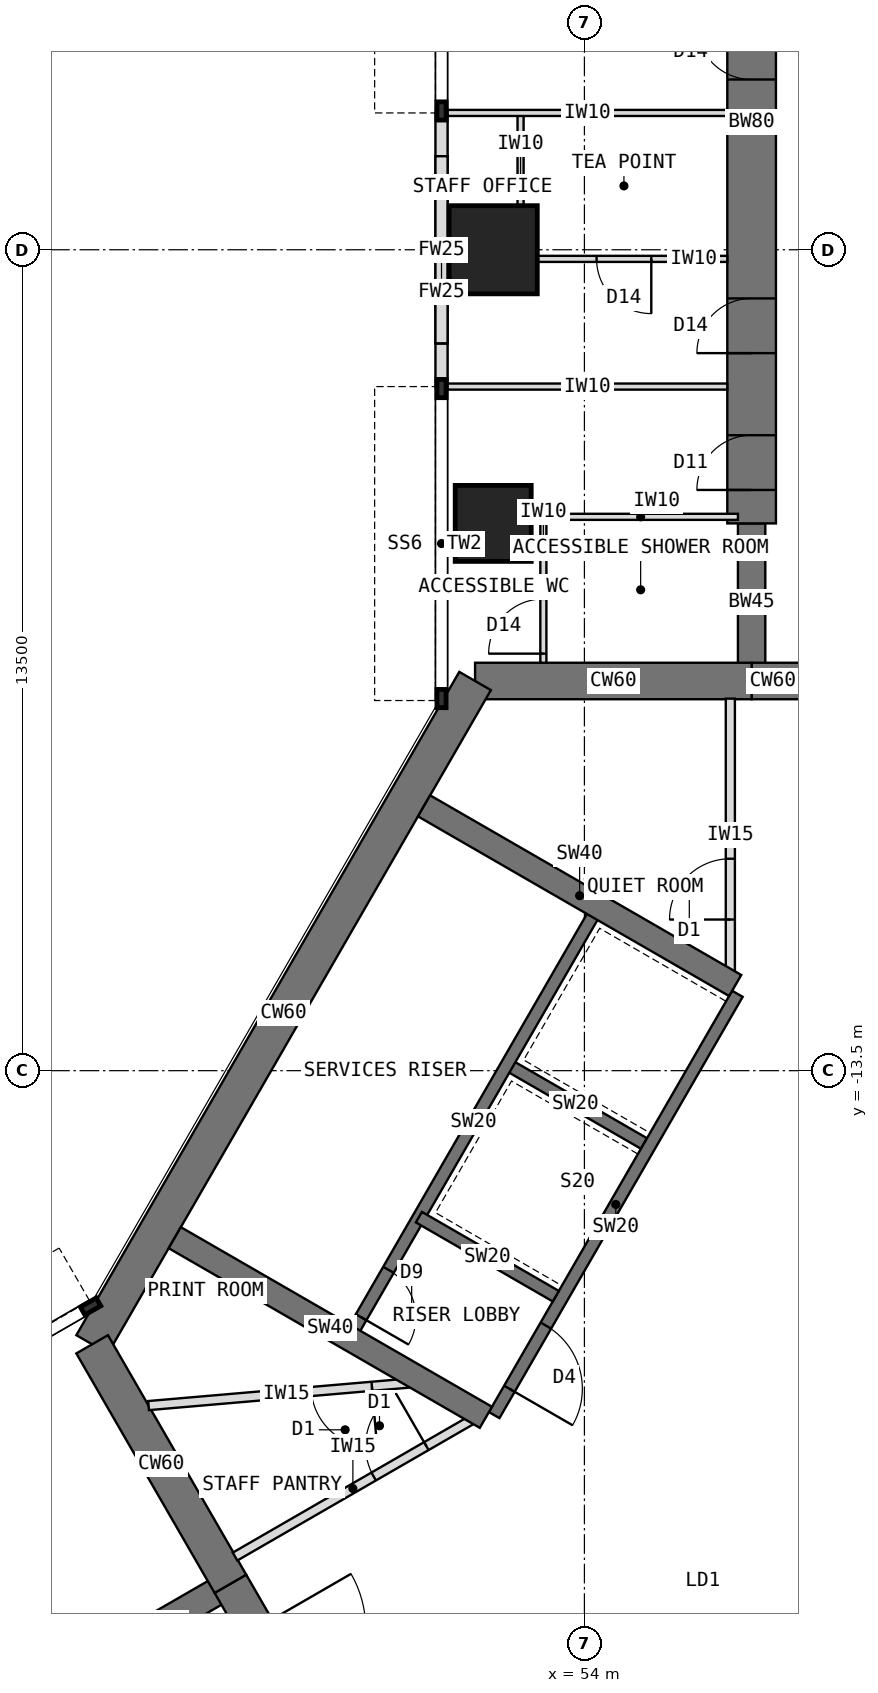
"""IFC4 building model, lengths in metres.
Left out: names, types, materials, properties, quantities, classifications, styles, units other than length and angle.
Written with IfcOpenShell. Run it as: python <this file> out.ifc"""

import sys

from ifc_helpers import new_model, si_unit, direction, frame, frame_2d, origin, origin_2d, place, context, subcontext, project, spatial, rectangle, extrude, element, fill, save


model = new_model("IFC4")
c1 = context("Model", 3, precision=1e-05, world=origin(), true_north=direction((0.0, 1.0)))
c2 = subcontext(c1, "Body", "Model", "MODEL_VIEW")
j1 = project(units=[si_unit("LENGTHUNIT", "METRE"), si_unit("PLANEANGLEUNIT", "RADIAN")], contexts=[c1])
p1 = place(None, origin())
s1 = spatial("IfcSite", under=j1, at=p1, CompositionType="ELEMENT")
p2 = place(p1, origin())
s2 = spatial("IfcBuilding", under=s1, at=p2, CompositionType="ELEMENT")
p3 = place(p2, frame((0.0, 0.0, 161.5)))
s3 = spatial("IfcBuildingStorey", under=s2, at=p3, CompositionType="ELEMENT", Elevation=161.5)
p4 = place(p3, frame((60.25, -7.092, 0.0), z_axis=(0.0, 0.0, 1.0), x_axis=(-1.0, 0.0, 0.0)))
e1 = element("IfcWall", 1, at=p4, inside=s3, PredefinedType="SHEAR", context=c2, shape_type="SweptSolid", body=[
    extrude(rectangle(XDim=3.5, YDim=0.6, at=frame_2d((1.75, 0.0))), origin(), (0.0, 0.0, 1.0), 4.0),
])
p5 = place(p4, frame((0.85, 0.0, 0.0)))
e2 = element("IfcOpeningElement", 2, at=p5, cuts=e1, PredefinedType="OPENING", context=c2, shape_type="SweptSolid", body=[
    extrude(rectangle(XDim=1.8, YDim=2.1, at=frame_2d((0.9, 1.05))), frame((0.0, 0.31, 0.0), z_axis=(0.0, -1.0, 0.0), x_axis=(1.0, 0.0, 0.0)), (0.0, 0.0, 1.0), 0.62),
])
p6 = place(p3, frame((56.75, -7.092, 0.0), z_axis=(0.0, 0.0, 1.0), x_axis=(-1.0, 0.0, 0.0)))
e3 = element("IfcWall", 3, at=p6, inside=s3, PredefinedType="SHEAR", context=c2, shape_type="SweptSolid", body=[
    extrude(rectangle(XDim=4.548, YDim=0.6, at=frame_2d((2.274, 0.0))), origin(), (0.0, 0.0, 1.0), 4.0),
])
p7 = place(p3, frame((52.202, -7.092, 0.0), z_axis=(0.0, 0.0, 1.0), x_axis=(-0.500005998175, -0.866021940709, 0.0)))
e4 = element("IfcWall", 4, at=p7, inside=s3, PredefinedType="SHEAR", context=c2, shape_type="SweptSolid", body=[
    extrude(rectangle(XDim=12.596, YDim=0.6, at=frame_2d((6.298, 0.0))), origin(), (0.0, 0.0, 1.0), 4.0),
])
p8 = place(p3, frame((45.904, -18.0, 0.0), z_axis=(0.0, 0.0, 1.0), x_axis=(0.500024481964, -0.866011268655, 0.0)))
e5 = element("IfcWall", 5, at=p8, inside=s3, PredefinedType="SHEAR", context=c2, shape_type="SweptSolid", body=[
    extrude(rectangle(XDim=4.548, YDim=0.6, at=frame_2d((2.274, 0.0))), origin(), (0.0, 0.0, 1.0), 4.0),
])
p9 = place(p3, frame((48.178, -21.939, 0.0), z_axis=(0.0, 0.0, 1.0), x_axis=(0.500010275428, -0.866019471182, 0.0)))
e6 = element("IfcWall", 6, at=p9, inside=s3, PredefinedType="SHEAR", context=c2, shape_type="SweptSolid", body=[
    extrude(rectangle(XDim=3.5, YDim=0.6, at=frame_2d((1.75, 0.0))), origin(), (0.0, 0.0, 1.0), 4.0),
])
p10 = place(p9, frame((0.85, 0.0, 0.0)))
e7 = element("IfcOpeningElement", 7, at=p10, cuts=e6, PredefinedType="OPENING", context=c2, shape_type="SweptSolid", body=[
    extrude(rectangle(XDim=1.8, YDim=2.1, at=frame_2d((0.9, 1.05))), frame((0.0, 0.31, 0.0), z_axis=(0.0, -1.0, 0.0), x_axis=(1.0, 0.0, 0.0)), (0.0, 0.0, 1.0), 0.62),
])
p11 = place(p3, frame((56.75, -7.092, 0.0), z_axis=(0.0, 0.0, 1.0), x_axis=(0.0, 1.0, 0.0)))
e8 = element("IfcWall", 8, at=p11, inside=s3, PredefinedType="SHEAR", context=c2, shape_type="SweptSolid", body=[
    extrude(rectangle(XDim=2.592, YDim=0.45, at=frame_2d((1.296, 0.0))), origin(), (0.0, 0.0, 1.0), 4.0),
])
p12 = place(p3, frame((56.75, -4.5, 0.0), z_axis=(0.0, 0.0, 1.0), x_axis=(0.0, 1.0, 0.0)))
e9 = element("IfcWall", 9, at=p12, inside=s3, PredefinedType="SHEAR", context=c2, shape_type="SweptSolid", body=[
    extrude(rectangle(XDim=13.2, YDim=0.8, at=frame_2d((6.6, 0.0))), origin(), (0.0, 0.0, 1.0), 4.0),
])
p13 = place(p12, frame((0.55, 0.0, 0.0)))
e10 = element("IfcOpeningElement", 10, at=p13, cuts=e9, PredefinedType="OPENING", context=c2, shape_type="SweptSolid", body=[
    extrude(rectangle(XDim=0.9, YDim=2.1, at=frame_2d((0.45, 1.05))), frame((0.0, 0.41, 0.0), z_axis=(0.0, -1.0, 0.0), x_axis=(1.0, 0.0, 0.0)), (0.0, 0.0, 1.0), 0.82),
])
p14 = place(p12, frame((2.8, 0.0, 0.0)))
e11 = element("IfcOpeningElement", 11, at=p14, cuts=e9, PredefinedType="OPENING", context=c2, shape_type="SweptSolid", body=[
    extrude(rectangle(XDim=0.9, YDim=2.1, at=frame_2d((0.45, 1.05))), frame((0.0, 0.41, 0.0), z_axis=(0.0, -1.0, 0.0), x_axis=(1.0, 0.0, 0.0)), (0.0, 0.0, 1.0), 0.82),
])
p15 = place(p12, frame((7.3, 0.0, 0.0)))
e12 = element("IfcOpeningElement", 12, at=p15, cuts=e9, PredefinedType="OPENING", context=c2, shape_type="SweptSolid", body=[
    extrude(rectangle(XDim=0.9, YDim=2.1, at=frame_2d((0.45, 1.05))), frame((0.0, 0.41, 0.0), z_axis=(0.0, -1.0, 0.0), x_axis=(1.0, 0.0, 0.0)), (0.0, 0.0, 1.0), 0.82),
])
p16 = place(p3, frame((48.178, -21.939, 0.0), z_axis=(0.0, 0.0, 1.0), x_axis=(-0.866072649678, -0.499918158782, 0.0)))
e13 = element("IfcWall", 13, at=p16, inside=s3, PredefinedType="SHEAR", context=c2, shape_type="SweptSolid", body=[
    extrude(rectangle(XDim=2.592, YDim=0.45, at=frame_2d((1.296, 0.0))), origin(), (0.0, 0.0, 1.0), 4.0),
])
p17 = place(p3, frame((52.5, -4.5, 0.0), z_axis=(0.0, 0.0, 1.0), x_axis=(1.0, 0.0, 0.0)))
e14 = element("IfcColumn", 14, at=p17, inside=s3, PredefinedType="COLUMN", context=c2, shape_type="SweptSolid", body=[
    extrude(rectangle(XDim=1.25, YDim=1.25, at=origin_2d()), origin(), (0.0, 0.0, 1.0), 4.0),
])
p18 = place(p3, frame((52.5, 0.0, 0.0), z_axis=(0.0, 0.0, 1.0), x_axis=(1.0, 0.0, 0.0)))
e15 = element("IfcColumn", 15, at=p18, inside=s3, PredefinedType="COLUMN", context=c2, shape_type="SweptSolid", body=[
    extrude(rectangle(XDim=1.45, YDim=1.45, at=origin_2d()), origin(), (0.0, 0.0, 1.0), 4.0),
])
for number, where, z_axis, x_axis in (
    (16, (51.65, -2.25, 0.0), (0.0, 0.0, 1.0), (0.0, 1.0, 0.0)),
    (17, (51.65, 1.539, 0.0), (0.0, 0.0, 1.0), (0.0, 1.0, 0.0)),
):
    element("IfcWall", number, at=place(p3, frame(where, z_axis=z_axis, x_axis=x_axis)), inside=s3, PredefinedType="STANDARD", context=c2, shape_type="SweptSolid", body=[
        extrude(rectangle(XDim=0.711, YDim=0.2, at=frame_2d((0.356, 0.0))), origin(), (0.0, 0.0, 1.0), 4.0),
    ])
p19 = place(p3, frame((51.65, -1.539, 0.0), z_axis=(0.0, 0.0, 1.0), x_axis=(0.0, 1.0, 0.0)))
e18 = element("IfcWall", 18, at=p19, inside=s3, PredefinedType="STANDARD", context=c2, shape_type="SweptSolid", body=[
    extrude(rectangle(XDim=3.077, YDim=0.2, at=frame_2d((1.539, 0.0))), origin(), (0.0, 0.0, 1.0), 1.306),
])
p20 = place(p3, frame((51.65, -1.539, 2.516), z_axis=(0.0, 0.0, 1.0), x_axis=(0.0, 1.0, 0.0)))
e19 = element("IfcWall", 19, at=p20, inside=s3, PredefinedType="STANDARD", context=c2, shape_type="SweptSolid", body=[
    extrude(rectangle(XDim=3.077, YDim=0.2, at=frame_2d((1.539, 0.0))), origin(), (0.0, 0.0, 1.0), 1.484),
])
p21 = place(p3, frame((56.516, -12.236, 0.0), z_axis=(0.0, 0.0, 1.0), x_axis=(-0.49999894854, -0.866026010844, 0.0)))
e20 = element("IfcWall", 20, at=p21, inside=s3, PredefinedType="SHEAR", context=c2, shape_type="SweptSolid", body=[
    extrude(rectangle(XDim=8.0, YDim=0.2, at=frame_2d((4.0, 0.0))), origin(), (0.0, 0.0, 1.0), 4.0),
])
p22 = place(p21, frame((6.3, 0.0, 0.0)))
e21 = element("IfcOpeningElement", 21, at=p22, cuts=e20, PredefinedType="OPENING", context=c2, shape_type="SweptSolid", body=[
    extrude(rectangle(XDim=1.2, YDim=2.1, at=frame_2d((0.6, 1.05))), frame((0.0, 0.11, 0.0), z_axis=(0.0, -1.0, 0.0), x_axis=(1.0, 0.0, 0.0)), (0.0, 0.0, 1.0), 0.22),
])
for number, where, z_axis, x_axis in (
    (22, (54.98, -14.697, 0.0), (0.0, 0.0, 1.0), (-0.866, 0.5, 0.0)),
    (23, (53.53, -17.209, 0.0), (0.0, 0.0, 1.0), (-0.866, 0.5, 0.0)),
):
    element("IfcWall", number, at=place(p3, frame(where, z_axis=z_axis, x_axis=x_axis)), inside=s3, PredefinedType="SHEAR", context=c2, shape_type="SweptSolid", body=[
        extrude(rectangle(XDim=2.6, YDim=0.2, at=frame_2d((1.3, 0.0))), origin(), (0.0, 0.0, 1.0), 4.0),
    ])
p23 = place(p3, frame((54.178, -10.886, 0.0), z_axis=(0.0, 0.0, 1.0), x_axis=(-0.49999894854, -0.866026010844, 0.0)))
e24 = element("IfcWall", 24, at=p23, inside=s3, PredefinedType="SHEAR", context=c2, shape_type="SweptSolid", body=[
    extrude(rectangle(XDim=8.0, YDim=0.2, at=frame_2d((4.0, 0.0))), origin(), (0.0, 0.0, 1.0), 4.0),
])
p24 = place(p23, frame((6.8, 0.0, 0.0)))
e25 = element("IfcOpeningElement", 25, at=p24, cuts=e24, PredefinedType="OPENING", context=c2, shape_type="SweptSolid", body=[
    extrude(rectangle(XDim=0.9, YDim=2.1, at=frame_2d((0.45, 1.05))), frame((0.0, 0.11, 0.0), z_axis=(0.0, -1.0, 0.0), x_axis=(1.0, 0.0, 0.0)), (0.0, 0.0, 1.0), 0.22),
])
p25 = place(p3, frame((52.38, -19.201, 0.0), z_axis=(0.0, 0.0, 1.0), x_axis=(-0.866027317282, 0.49999668571, 0.0)))
e26 = element("IfcWall", 26, at=p25, inside=s3, PredefinedType="SHEAR", context=c2, shape_type="SweptSolid", body=[
    extrude(rectangle(XDim=5.908, YDim=0.4, at=frame_2d((2.954, 0.0))), origin(), (0.0, 0.0, 1.0), 4.0),
])
p26 = place(p3, frame((56.48, -12.099, 0.0), z_axis=(0.0, 0.0, 1.0), x_axis=(-0.866009424208, 0.500027676417, 0.0)))
e27 = element("IfcWall", 27, at=p26, inside=s3, PredefinedType="SHEAR", context=c2, shape_type="SweptSolid", body=[
    extrude(rectangle(XDim=5.908, YDim=0.4, at=frame_2d((2.954, 0.0))), origin(), (0.0, 0.0, 1.0), 4.0),
])
for number, where, z_axis, x_axis in (
    (28, (56.35, -2.25, 0.0), (0.0, 0.0, 1.0), (-1.0, 0.0, 0.0)),
    (29, (56.35, 2.25, 0.0), (0.0, 0.0, 1.0), (-1.0, 0.0, 0.0)),
):
    element("IfcWall", number, at=place(p3, frame(where, z_axis=z_axis, x_axis=x_axis)), inside=s3, PredefinedType="PARTITIONING", context=c2, shape_type="SweptSolid", body=[
        extrude(rectangle(XDim=4.6, YDim=0.1, at=frame_2d((2.3, 0.0))), origin(), (0.0, 0.0, 1.0), 3.7),
    ])
p27 = place(p3, frame((52.95, -0.15, 0.0), z_axis=(0.0, 0.0, 1.0), x_axis=(0.0, 1.0, 0.0)))
e30 = element("IfcWall", 30, at=p27, inside=s3, PredefinedType="PARTITIONING", context=c2, shape_type="SweptSolid", body=[
    extrude(rectangle(XDim=2.4, YDim=0.1, at=frame_2d((1.2, 0.0))), origin(), (0.0, 0.0, 1.0), 3.7),
])
p28 = place(p3, frame((56.35, -0.15, 0.0), z_axis=(0.0, 0.0, 1.0), x_axis=(-1.0, 0.0, 0.0)))
e31 = element("IfcWall", 31, at=p28, inside=s3, PredefinedType="PARTITIONING", context=c2, shape_type="SweptSolid", body=[
    extrude(rectangle(XDim=3.4, YDim=0.1, at=frame_2d((1.7, 0.0))), origin(), (0.0, 0.0, 1.0), 3.7),
])
p29 = place(p28, frame((1.25, 0.0, 0.0)))
e32 = element("IfcOpeningElement", 32, at=p29, cuts=e31, PredefinedType="OPENING", context=c2, shape_type="SweptSolid", body=[
    extrude(rectangle(XDim=0.9, YDim=2.1, at=frame_2d((0.45, 1.05))), frame((0.0, 0.06, 0.0), z_axis=(0.0, -1.0, 0.0), x_axis=(1.0, 0.0, 0.0)), (0.0, 0.0, 1.0), 0.12),
])
p30 = place(p3, frame((53.325, -6.792, 0.0), z_axis=(0.0, 0.0, 1.0), x_axis=(0.0, 1.0, 0.0)))
e33 = element("IfcWall", 33, at=p30, inside=s3, PredefinedType="PARTITIONING", context=c2, shape_type="SweptSolid", body=[
    extrude(rectangle(XDim=2.4, YDim=0.1, at=frame_2d((1.2, 0.0))), origin(), (0.0, 0.0, 1.0), 3.7),
])
p31 = place(p30, frame((0.15, 0.0, 0.0)))
e34 = element("IfcOpeningElement", 34, at=p31, cuts=e33, PredefinedType="OPENING", context=c2, shape_type="SweptSolid", body=[
    extrude(rectangle(XDim=0.9, YDim=2.1, at=frame_2d((0.45, 1.05))), frame((0.0, 0.06, 0.0), z_axis=(0.0, -1.0, 0.0), x_axis=(1.0, 0.0, 0.0)), (0.0, 0.0, 1.0), 0.12),
])
p32 = place(p3, frame((56.525, -4.392, 0.0), z_axis=(0.0, 0.0, 1.0), x_axis=(-1.0, 0.0, 0.0)))
e35 = element("IfcWall", 35, at=p32, inside=s3, PredefinedType="PARTITIONING", context=c2, shape_type="SweptSolid", body=[
    extrude(rectangle(XDim=3.2, YDim=0.1, at=frame_2d((1.6, 0.0))), origin(), (0.0, 0.0, 1.0), 3.7),
])
p33 = place(p3, frame((48.254, -21.49, 0.0), z_axis=(0.0, 0.0, 1.0), x_axis=(0.866025707867, 0.499999473313, 0.0)))
e36 = element("IfcWall", 36, at=p33, inside=s3, PredefinedType="PARTITIONING", context=c2, shape_type="SweptSolid", body=[
    extrude(rectangle(XDim=4.476, YDim=0.15, at=frame_2d((2.238, 0.0))), origin(), (0.0, 0.0, 1.0), 3.7),
])
p34 = place(p33, frame((2.633, 0.0, 0.0)))
e37 = element("IfcOpeningElement", 37, at=p34, cuts=e36, PredefinedType="OPENING", context=c2, shape_type="SweptSolid", body=[
    extrude(rectangle(XDim=1.0, YDim=2.1, at=frame_2d((0.5, 1.05))), frame((0.0, 0.085, 0.0), z_axis=(0.0, -1.0, 0.0), x_axis=(1.0, 0.0, 0.0)), (0.0, 0.0, 1.0), 0.17),
])
p35 = place(p3, frame((56.4, -11.857, 0.0), z_axis=(0.0, 0.0, 1.0), x_axis=(0.0, 1.0, 0.0)))
e38 = element("IfcWall", 38, at=p35, inside=s3, PredefinedType="PARTITIONING", context=c2, shape_type="SweptSolid", body=[
    extrude(rectangle(XDim=4.476, YDim=0.15, at=frame_2d((2.238, 0.0))), origin(), (0.0, 0.0, 1.0), 3.7),
])
p36 = place(p35, frame((0.843, 0.0, 0.0)))
e39 = element("IfcOpeningElement", 39, at=p36, cuts=e38, PredefinedType="OPENING", context=c2, shape_type="SweptSolid", body=[
    extrude(rectangle(XDim=1.0, YDim=2.1, at=frame_2d((0.5, 1.05))), frame((0.0, 0.085, 0.0), z_axis=(0.0, -1.0, 0.0), x_axis=(1.0, 0.0, 0.0)), (0.0, 0.0, 1.0), 0.17),
])
p37 = place(p3, frame((51.367, -18.616, 0.0), z_axis=(0.0, 0.0, 1.0), x_axis=(-0.996291540593, -0.086041653535, 0.0)))
e40 = element("IfcWall", 40, at=p37, inside=s3, PredefinedType="PARTITIONING", context=c2, shape_type="SweptSolid", body=[
    extrude(rectangle(XDim=4.551, YDim=0.15, at=frame_2d((2.276, 0.0))), origin(), (0.0, 0.0, 1.0), 3.7),
])
p38 = place(p37, frame((0.865, 0.0, 0.0)))
e41 = element("IfcOpeningElement", 41, at=p38, cuts=e40, PredefinedType="OPENING", context=c2, shape_type="SweptSolid", body=[
    extrude(rectangle(XDim=1.0, YDim=2.1, at=frame_2d((0.5, 1.05))), frame((0.0, 0.085, 0.0), z_axis=(0.0, -1.0, 0.0), x_axis=(1.0, 0.0, 0.0)), (0.0, 0.0, 1.0), 0.17),
])
p39 = place(p22, origin())
e42 = element("IfcDoor", 42, at=p39, inside=s3, OperationType="SINGLE_SWING_RIGHT", PredefinedType="DOOR", context=c2, shape_type="SweptSolid", body=[
    extrude(rectangle(XDim=1.2, YDim=2.1, at=frame_2d((0.6, 1.05))), frame((0.0, 0.025, 0.0), z_axis=(0.0, -1.0, 0.0), x_axis=(1.0, 0.0, 0.0)), (0.0, 0.0, 1.0), 0.05),
])
fill(e21, e42)
p40 = place(p24, origin())
e43 = element("IfcDoor", 43, at=p40, inside=s3, OperationType="SINGLE_SWING_RIGHT", PredefinedType="DOOR", context=c2, shape_type="SweptSolid", body=[
    extrude(rectangle(XDim=0.9, YDim=2.1, at=frame_2d((0.45, 1.05))), frame((0.0, 0.025, 0.0), z_axis=(0.0, -1.0, 0.0), x_axis=(1.0, 0.0, 0.0)), (0.0, 0.0, 1.0), 0.05),
])
fill(e25, e43)
p41 = place(p29, origin())
e44 = element("IfcDoor", 44, at=p41, inside=s3, OperationType="SINGLE_SWING_LEFT", PredefinedType="DOOR", context=c2, shape_type="SweptSolid", body=[
    extrude(rectangle(XDim=0.9, YDim=2.1, at=frame_2d((0.45, 1.05))), frame((0.0, 0.025, 0.0), z_axis=(0.0, -1.0, 0.0), x_axis=(1.0, 0.0, 0.0)), (0.0, 0.0, 1.0), 0.05),
])
fill(e32, e44)
p42 = place(p31, origin())
e45 = element("IfcDoor", 45, at=p42, inside=s3, OperationType="SINGLE_SWING_LEFT", PredefinedType="DOOR", context=c2, shape_type="SweptSolid", body=[
    extrude(rectangle(XDim=0.9, YDim=2.1, at=frame_2d((0.45, 1.05))), frame((0.0, 0.025, 0.0), z_axis=(0.0, -1.0, 0.0), x_axis=(1.0, 0.0, 0.0)), (0.0, 0.0, 1.0), 0.05),
])
fill(e34, e45)
p43 = place(p38, origin())
e46 = element("IfcDoor", 46, at=p43, inside=s3, OperationType="SINGLE_SWING_LEFT", PredefinedType="DOOR", context=c2, shape_type="SweptSolid", body=[
    extrude(rectangle(XDim=1.0, YDim=2.1, at=frame_2d((0.5, 1.05))), frame((0.0, 0.025, 0.0), z_axis=(0.0, -1.0, 0.0), x_axis=(1.0, 0.0, 0.0)), (0.0, 0.0, 1.0), 0.05),
])
fill(e41, e46)
p44 = place(p34, origin())
e47 = element("IfcDoor", 47, at=p44, inside=s3, OperationType="SINGLE_SWING_RIGHT", PredefinedType="DOOR", context=c2, shape_type="SweptSolid", body=[
    extrude(rectangle(XDim=1.0, YDim=2.1, at=frame_2d((0.5, 1.05))), frame((0.0, 0.025, 0.0), z_axis=(0.0, -1.0, 0.0), x_axis=(1.0, 0.0, 0.0)), (0.0, 0.0, 1.0), 0.05),
])
fill(e37, e47)
p45 = place(p36, origin())
e48 = element("IfcDoor", 48, at=p45, inside=s3, OperationType="SINGLE_SWING_LEFT", PredefinedType="DOOR", context=c2, shape_type="SweptSolid", body=[
    extrude(rectangle(XDim=1.0, YDim=2.1, at=frame_2d((0.5, 1.05))), frame((0.0, 0.025, 0.0), z_axis=(0.0, -1.0, 0.0), x_axis=(1.0, 0.0, 0.0)), (0.0, 0.0, 1.0), 0.05),
])
fill(e39, e48)
p46 = place(p13, origin())
e49 = element("IfcDoor", 49, at=p46, inside=s3, OperationType="SINGLE_SWING_LEFT", PredefinedType="DOOR", context=c2, shape_type="SweptSolid", body=[
    extrude(rectangle(XDim=0.82, YDim=2.06, at=frame_2d((0.45, 1.03))), frame((0.0, 0.025, 0.0), z_axis=(0.0, -1.0, 0.0), x_axis=(1.0, 0.0, 0.0)), (0.0, 0.0, 1.0), 0.05),
    extrude(rectangle(XDim=0.04, YDim=2.1, at=frame_2d((0.02, 1.05))), frame((0.0, 0.4, 0.0), z_axis=(0.0, -1.0, 0.0), x_axis=(1.0, 0.0, 0.0)), (0.0, 0.0, 1.0), 0.8),
    extrude(rectangle(XDim=0.04, YDim=2.1, at=frame_2d((0.88, 1.05))), frame((0.0, 0.4, 0.0), z_axis=(0.0, -1.0, 0.0), x_axis=(1.0, 0.0, 0.0)), (0.0, 0.0, 1.0), 0.8),
    extrude(rectangle(XDim=0.82, YDim=0.04, at=frame_2d((0.45, 2.08))), frame((0.0, 0.4, 0.0), z_axis=(0.0, -1.0, 0.0), x_axis=(1.0, 0.0, 0.0)), (0.0, 0.0, 1.0), 0.8),
])
fill(e10, e49)
p47 = place(p14, origin())
e50 = element("IfcDoor", 50, at=p47, inside=s3, OperationType="SINGLE_SWING_LEFT", PredefinedType="DOOR", context=c2, shape_type="SweptSolid", body=[
    extrude(rectangle(XDim=0.82, YDim=2.06, at=frame_2d((0.45, 1.03))), frame((0.0, 0.025, 0.0), z_axis=(0.0, -1.0, 0.0), x_axis=(1.0, 0.0, 0.0)), (0.0, 0.0, 1.0), 0.05),
    extrude(rectangle(XDim=0.04, YDim=2.1, at=frame_2d((0.02, 1.05))), frame((0.0, 0.4, 0.0), z_axis=(0.0, -1.0, 0.0), x_axis=(1.0, 0.0, 0.0)), (0.0, 0.0, 1.0), 0.8),
    extrude(rectangle(XDim=0.04, YDim=2.1, at=frame_2d((0.88, 1.05))), frame((0.0, 0.4, 0.0), z_axis=(0.0, -1.0, 0.0), x_axis=(1.0, 0.0, 0.0)), (0.0, 0.0, 1.0), 0.8),
    extrude(rectangle(XDim=0.82, YDim=0.04, at=frame_2d((0.45, 2.08))), frame((0.0, 0.4, 0.0), z_axis=(0.0, -1.0, 0.0), x_axis=(1.0, 0.0, 0.0)), (0.0, 0.0, 1.0), 0.8),
])
fill(e11, e50)
p48 = place(p15, origin())
e51 = element("IfcDoor", 51, at=p48, inside=s3, OperationType="SINGLE_SWING_RIGHT", PredefinedType="DOOR", context=c2, shape_type="SweptSolid", body=[
    extrude(rectangle(XDim=0.82, YDim=2.06, at=frame_2d((0.45, 1.03))), frame((0.0, 0.025, 0.0), z_axis=(0.0, -1.0, 0.0), x_axis=(1.0, 0.0, 0.0)), (0.0, 0.0, 1.0), 0.05),
    extrude(rectangle(XDim=0.04, YDim=2.1, at=frame_2d((0.02, 1.05))), frame((0.0, 0.4, 0.0), z_axis=(0.0, -1.0, 0.0), x_axis=(1.0, 0.0, 0.0)), (0.0, 0.0, 1.0), 0.8),
    extrude(rectangle(XDim=0.04, YDim=2.1, at=frame_2d((0.88, 1.05))), frame((0.0, 0.4, 0.0), z_axis=(0.0, -1.0, 0.0), x_axis=(1.0, 0.0, 0.0)), (0.0, 0.0, 1.0), 0.8),
    extrude(rectangle(XDim=0.82, YDim=0.04, at=frame_2d((0.45, 2.08))), frame((0.0, 0.4, 0.0), z_axis=(0.0, -1.0, 0.0), x_axis=(1.0, 0.0, 0.0)), (0.0, 0.0, 1.0), 0.8),
])
fill(e12, e51)
save(model, sys.argv[1])
